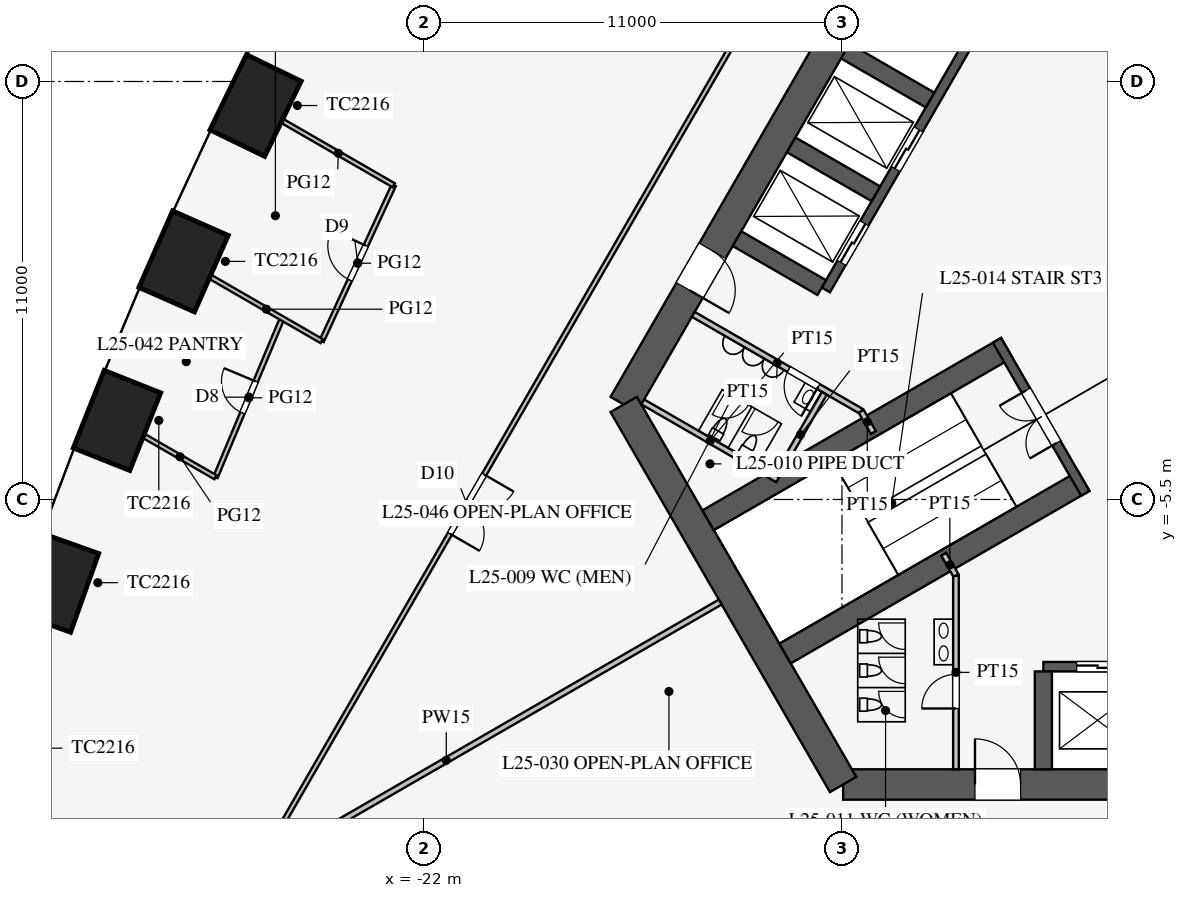
"""IFC4 building model, lengths in metres.
Left out: names, types, materials, properties, quantities, classifications, styles, units other than length and angle.
Written with IfcOpenShell. Run it as: python <this file> out.ifc"""

import sys

from ifc_helpers import new_model, si_unit, direction, frame, frame_2d, origin, origin_2d, place, context, subcontext, project, spatial, rectangle, extrude, element, fill, save


model = new_model("IFC4")
c1 = context("Model", 3, precision=1e-05, world=origin(), true_north=direction((0.0, 1.0)))
c2 = subcontext(c1, "Body", "Model", "MODEL_VIEW")
j1 = project(units=[si_unit("LENGTHUNIT", "METRE"), si_unit("PLANEANGLEUNIT", "RADIAN")], contexts=[c1])
p1 = place(None, origin())
s1 = spatial("IfcSite", under=j1, at=p1, CompositionType="ELEMENT")
p2 = place(p1, origin())
s2 = spatial("IfcBuilding", under=s1, at=p2, CompositionType="ELEMENT")
p3 = place(p2, frame((0.0, 0.0, 111.5)))
s3 = spatial("IfcBuildingStorey", under=s2, at=p3, CompositionType="ELEMENT", Elevation=111.5)
for number, where, z_axis, x_axis in (
    (1, (-26.43, 4.867, 0.0), (0.0, 0.0, 1.0), (-0.436, -0.9, 0.0)),
    (2, (-28.325, 0.765, 0.0), (0.0, 0.0, 1.0), (-0.403, -0.915, 0.0)),
    (3, (-30.077, -3.42, 0.0), (0.0, 0.0, 1.0), (-0.37, -0.929, 0.0)),
    (4, (-31.682, -7.689, 0.0), (0.0, 0.0, 1.0), (-0.336, -0.942, 0.0)),
):
    element("IfcColumn", number, at=place(p3, frame(where, z_axis=z_axis, x_axis=x_axis)), inside=s3, PredefinedType="COLUMN", context=c2, shape_type="SweptSolid", body=[
        extrude(rectangle(XDim=2.2, YDim=1.6, at=origin_2d()), origin(), (0.0, 0.0, 1.0), 4.2),
    ])
p4 = place(p3, frame((-10.97, -13.0, 0.0), z_axis=(0.0, 0.0, 1.0), x_axis=(1.0, 0.0, 0.0)))
e5 = element("IfcWall", 5, at=p4, inside=s3, PredefinedType="SHEAR", context=c2, shape_type="SweptSolid", body=[
    extrude(rectangle(XDim=21.939, YDim=0.8, at=frame_2d((10.97, 0.0))), origin(), (0.0, 0.0, 1.0), 4.2),
])
p5 = place(p4, frame((17.27, 0.0, 0.0)))
e6 = element("IfcOpeningElement", 6, at=p5, cuts=e5, PredefinedType="OPENING", context=c2, shape_type="SweptSolid", body=[
    extrude(rectangle(XDim=1.2, YDim=2.1, at=frame_2d((0.6, 1.05))), frame((0.0, 0.41, 0.0), z_axis=(0.0, -1.0, 0.0), x_axis=(1.0, 0.0, 0.0)), (0.0, 0.0, 1.0), 0.82),
])
p6 = place(p4, frame((3.47, 0.0, 0.0)))
e7 = element("IfcOpeningElement", 7, at=p6, cuts=e5, PredefinedType="OPENING", context=c2, shape_type="SweptSolid", body=[
    extrude(rectangle(XDim=1.2, YDim=2.1, at=frame_2d((0.6, 1.05))), frame((0.0, 0.41, 0.0), z_axis=(0.0, -1.0, 0.0), x_axis=(1.0, 0.0, 0.0)), (0.0, 0.0, 1.0), 0.82),
])
p7 = place(p3, frame((-5.773, 16.0, 0.0), z_axis=(0.0, 0.0, 1.0), x_axis=(-0.500002442456, -0.866023993627, 0.0)))
e8 = element("IfcWall", 8, at=p7, inside=s3, PredefinedType="SHEAR", context=c2, shape_type="SweptSolid", body=[
    extrude(rectangle(XDim=21.939, YDim=0.8, at=frame_2d((10.97, 0.0))), origin(), (0.0, 0.0, 1.0), 4.2),
])
p8 = place(p7, frame((17.27, 0.0, 0.0)))
e9 = element("IfcOpeningElement", 9, at=p8, cuts=e8, PredefinedType="OPENING", context=c2, shape_type="SweptSolid", body=[
    extrude(rectangle(XDim=1.2, YDim=2.1, at=frame_2d((0.6, 1.05))), frame((0.0, 0.41, 0.0), z_axis=(0.0, -1.0, 0.0), x_axis=(1.0, 0.0, 0.0)), (0.0, 0.0, 1.0), 0.82),
])
p9 = place(p7, frame((3.47, 0.0, 0.0)))
e10 = element("IfcOpeningElement", 10, at=p9, cuts=e8, PredefinedType="OPENING", context=c2, shape_type="SweptSolid", body=[
    extrude(rectangle(XDim=1.2, YDim=2.1, at=frame_2d((0.6, 1.05))), frame((0.0, 0.41, 0.0), z_axis=(0.0, -1.0, 0.0), x_axis=(1.0, 0.0, 0.0)), (0.0, 0.0, 1.0), 0.82),
])
p10 = place(p3, frame((-16.743, -3.0, 0.0), z_axis=(0.0, 0.0, 1.0), x_axis=(0.499995765644, -0.866027848477, 0.0)))
e11 = element("IfcWall", 11, at=p10, inside=s3, PredefinedType="SHEAR", context=c2, shape_type="SweptSolid", body=[
    extrude(rectangle(XDim=11.547, YDim=0.8, at=frame_2d((5.773, 0.0))), origin(), (0.0, 0.0, 1.0), 4.2),
])
p11 = place(p3, frame((-5.7, -9.9, 0.0), z_axis=(0.0, 0.0, 1.0), x_axis=(1.0, 0.0, 0.0)))
e12 = element("IfcWall", 12, at=p11, inside=s3, PredefinedType="SHEAR", context=c2, shape_type="SweptSolid", body=[
    extrude(rectangle(XDim=11.4, YDim=0.25, at=frame_2d((5.7, 0.0))), origin(), (0.0, 0.0, 1.0), 4.2),
])
p12 = place(p11, frame((0.875, 0.0, 0.0)))
e13 = element("IfcOpeningElement", 13, at=p12, cuts=e12, PredefinedType="OPENING", context=c2, shape_type="SweptSolid", body=[
    extrude(rectangle(XDim=1.1, YDim=2.2, at=frame_2d((0.55, 1.1))), frame((0.0, 0.135, 0.0), z_axis=(0.0, -1.0, 0.0), x_axis=(1.0, 0.0, 0.0)), (0.0, 0.0, 1.0), 0.27),
])
p13 = place(p11, frame((3.725, 0.0, 0.0)))
e14 = element("IfcOpeningElement", 14, at=p13, cuts=e12, PredefinedType="OPENING", context=c2, shape_type="SweptSolid", body=[
    extrude(rectangle(XDim=1.1, YDim=2.2, at=frame_2d((0.55, 1.1))), frame((0.0, 0.135, 0.0), z_axis=(0.0, -1.0, 0.0), x_axis=(1.0, 0.0, 0.0)), (0.0, 0.0, 1.0), 0.27),
])
p14 = place(p11, frame((6.575, 0.0, 0.0)))
e15 = element("IfcOpeningElement", 15, at=p14, cuts=e12, PredefinedType="OPENING", context=c2, shape_type="SweptSolid", body=[
    extrude(rectangle(XDim=1.1, YDim=2.2, at=frame_2d((0.55, 1.1))), frame((0.0, 0.135, 0.0), z_axis=(0.0, -1.0, 0.0), x_axis=(1.0, 0.0, 0.0)), (0.0, 0.0, 1.0), 0.27),
])
p15 = place(p11, frame((9.425, 0.0, 0.0)))
e16 = element("IfcOpeningElement", 16, at=p15, cuts=e12, PredefinedType="OPENING", context=c2, shape_type="SweptSolid", body=[
    extrude(rectangle(XDim=1.1, YDim=2.2, at=frame_2d((0.55, 1.1))), frame((0.0, 0.135, 0.0), z_axis=(0.0, -1.0, 0.0), x_axis=(1.0, 0.0, 0.0)), (0.0, 0.0, 1.0), 0.27),
])
p16 = place(p3, frame((-5.7, -10.025, 0.0), z_axis=(0.0, 0.0, 1.0), x_axis=(0.0, -1.0, 0.0)))
e17 = element("IfcWall", 17, at=p16, inside=s3, PredefinedType="SHEAR", context=c2, shape_type="SweptSolid", body=[
    extrude(rectangle(XDim=2.575, YDim=0.45, at=frame_2d((1.288, 0.0))), origin(), (0.0, 0.0, 1.0), 4.2),
])
p17 = place(p3, frame((-5.724, 9.886, 0.0), z_axis=(0.0, 0.0, 1.0), x_axis=(-0.500001763848, -0.866024385424, 0.0)))
e18 = element("IfcWall", 18, at=p17, inside=s3, PredefinedType="SHEAR", context=c2, shape_type="SweptSolid", body=[
    extrude(rectangle(XDim=11.4, YDim=0.25, at=frame_2d((5.7, 0.0))), origin(), (0.0, 0.0, 1.0), 4.2),
])
p18 = place(p17, frame((6.525, 0.0, 0.0)))
e19 = element("IfcOpeningElement", 19, at=p18, cuts=e18, PredefinedType="OPENING", context=c2, shape_type="SweptSolid", body=[
    extrude(rectangle(XDim=1.2, YDim=2.2, at=frame_2d((0.6, 1.1))), frame((0.0, 0.135, 0.0), z_axis=(0.0, -1.0, 0.0), x_axis=(1.0, 0.0, 0.0)), (0.0, 0.0, 1.0), 0.27),
])
p19 = place(p17, frame((9.375, 0.0, 0.0)))
e20 = element("IfcOpeningElement", 20, at=p19, cuts=e18, PredefinedType="OPENING", context=c2, shape_type="SweptSolid", body=[
    extrude(rectangle(XDim=1.2, YDim=2.2, at=frame_2d((0.6, 1.1))), frame((0.0, 0.135, 0.0), z_axis=(0.0, -1.0, 0.0), x_axis=(1.0, 0.0, 0.0)), (0.0, 0.0, 1.0), 0.27),
])
for number, where, z_axis, x_axis in (
    (21, (-8.682, 5.012, 0.0), (0.0, 0.0, 1.0), (-0.866, 0.5, 0.0)),
    (22, (-10.107, 2.544, 0.0), (0.0, 0.0, 1.0), (-0.866, 0.5, 0.0)),
    (23, (-11.532, 0.076, 0.0), (0.0, 0.0, 1.0), (-0.866, 0.5, 0.0)),
):
    element("IfcWall", number, at=place(p3, frame(where, z_axis=z_axis, x_axis=x_axis)), inside=s3, PredefinedType="SHEAR", context=c2, shape_type="SweptSolid", body=[
        extrude(rectangle(XDim=2.575, YDim=0.45, at=frame_2d((1.288, 0.0))), origin(), (0.0, 0.0, 1.0), 4.2),
    ])
for number, where, z_axis, x_axis in (
    (24, (-6.663, -1.509, 0.0), (0.0, 0.0, 1.0), (-0.866, -0.5, 0.0)),
    (25, (-4.638, -5.016, 0.0), (0.0, 0.0, 1.0), (-0.866, -0.5, 0.0)),
):
    element("IfcWall", number, at=place(p3, frame(where, z_axis=z_axis, x_axis=x_axis)), inside=s3, PredefinedType="SHEAR", context=c2, shape_type="SweptSolid", body=[
        extrude(rectangle(XDim=9.075, YDim=0.6, at=frame_2d((4.538, 0.0))), origin(), (0.0, 0.0, 1.0), 4.2),
    ])
p20 = place(p3, frame((-6.922, -1.312, 0.0), z_axis=(0.0, 0.0, 1.0), x_axis=(0.499984536904, -0.866034331223, 0.0)))
e26 = element("IfcWall", 26, at=p20, inside=s3, PredefinedType="SHEAR", context=c2, shape_type="SweptSolid", body=[
    extrude(rectangle(XDim=4.65, YDim=0.25, at=frame_2d((2.325, 0.0))), origin(), (0.0, 0.0, 1.0), 4.2),
])
p21 = place(p20, frame((1.525, 0.0, 0.0)))
e27 = element("IfcOpeningElement", 27, at=p21, cuts=e26, PredefinedType="OPENING", context=c2, shape_type="SweptSolid", body=[
    extrude(rectangle(XDim=1.6, YDim=2.1, at=frame_2d((0.8, 1.05))), frame((0.0, 0.135, 0.0), z_axis=(0.0, -1.0, 0.0), x_axis=(1.0, 0.0, 0.0)), (0.0, 0.0, 1.0), 0.27),
])
p22 = place(p3, frame((-8.0, -7.5, 0.0), z_axis=(0.0, 0.0, 1.0), x_axis=(0.0, -1.0, 0.0)))
e28 = element("IfcWall", 28, at=p22, inside=s3, PredefinedType="PARTITIONING", context=c2, shape_type="SweptSolid", body=[
    extrude(rectangle(XDim=5.1, YDim=0.15, at=frame_2d((2.55, 0.0))), origin(), (0.0, 0.0, 1.0), 4.0),
])
p23 = place(p22, frame((2.6, 0.0, 0.0)))
e29 = element("IfcOpeningElement", 29, at=p23, cuts=e28, PredefinedType="OPENING", context=c2, shape_type="SweptSolid", body=[
    extrude(rectangle(XDim=0.9, YDim=2.1, at=frame_2d((0.45, 1.05))), frame((0.0, 0.085, 0.0), z_axis=(0.0, -1.0, 0.0), x_axis=(1.0, 0.0, 0.0)), (0.0, 0.0, 1.0), 0.17),
])
p24 = place(p3, frame((-10.495, -3.178, 0.0), z_axis=(0.0, 0.0, 1.0), x_axis=(-0.86602216432, 0.500005610874, 0.0)))
e30 = element("IfcWall", 30, at=p24, inside=s3, PredefinedType="PARTITIONING", context=c2, shape_type="SweptSolid", body=[
    extrude(rectangle(XDim=5.1, YDim=0.15, at=frame_2d((2.55, 0.0))), origin(), (0.0, 0.0, 1.0), 4.0),
])
p25 = place(p24, frame((1.3, 0.0, 0.0)))
e31 = element("IfcOpeningElement", 31, at=p25, cuts=e30, PredefinedType="OPENING", context=c2, shape_type="SweptSolid", body=[
    extrude(rectangle(XDim=0.9, YDim=2.1, at=frame_2d((0.45, 1.05))), frame((0.0, 0.085, 0.0), z_axis=(0.0, -1.0, 0.0), x_axis=(1.0, 0.0, 0.0)), (0.0, 0.0, 1.0), 0.17),
])
for number, where, z_axis, x_axis in (
    (32, (-10.495, -3.178, 0.0), (0.0, 0.0, 1.0), (0.5, -0.866, 0.0)),
    (33, (-8.0, -7.5, 0.0), (0.0, 0.0, 1.0), (-0.5, 0.866, 0.0)),
):
    element("IfcWall", number, at=place(p3, frame(where, z_axis=z_axis, x_axis=x_axis)), inside=s3, PredefinedType="PARTITIONING", context=c2, shape_type="SweptSolid", body=[
        extrude(rectangle(XDim=0.645, YDim=0.15, at=frame_2d((0.323, 0.0))), origin(), (0.0, 0.0, 1.0), 4.0),
    ])
p26 = place(p3, frame((-12.691, -4.982, 0.0), z_axis=(0.0, 0.0, 1.0), x_axis=(-0.8660249478, 0.500000789788, 0.0)))
e34 = element("IfcWall", 34, at=p26, inside=s3, PredefinedType="PARTITIONING", context=c2, shape_type="SweptSolid", body=[
    extrude(rectangle(XDim=4.1, YDim=0.15, at=frame_2d((2.05, 0.0))), origin(), (0.0, 0.0, 1.0), 4.0),
])
p27 = place(p3, frame((-11.464, -2.706, 0.0), z_axis=(0.0, 0.0, 1.0), x_axis=(-0.50001992892, -0.866013897511, 0.0)))
e35 = element("IfcWall", 35, at=p27, inside=s3, PredefinedType="PARTITIONING", context=c2, shape_type="SweptSolid", body=[
    extrude(rectangle(XDim=2.51, YDim=0.15, at=frame_2d((1.255, 0.0))), origin(), (0.0, 0.0, 1.0), 4.0),
])
p28 = place(p3, frame((-14.203, -8.2, 0.0), z_axis=(0.0, 0.0, 1.0), x_axis=(-0.866024668836, -0.500001272966, 0.0)))
e36 = element("IfcWall", 36, at=p28, inside=s3, PredefinedType="PARTITIONING", context=c2, shape_type="SweptSolid", body=[
    extrude(rectangle(XDim=16.65, YDim=0.15, at=frame_2d((8.325, 0.0))), origin(), (0.0, 0.0, 1.0), 2.3),
])
p29 = place(p3, frame((-0.016, 30.491, 0.0), z_axis=(0.0, 0.0, 1.0), x_axis=(-0.50000091641, -0.866024874695, 0.0)))
e37 = element("IfcWall", 37, at=p29, inside=s3, PredefinedType="PARTITIONING", context=c2, shape_type="SweptSolid", body=[
    extrude(rectangle(XDim=52.796, YDim=0.12, at=frame_2d((26.398, 0.0))), origin(), (0.0, 0.0, 1.0), 2.9),
])
p30 = place(p29, frame((10.2, 0.0, 0.15)))
e38 = element("IfcOpeningElement", 38, at=p30, cuts=e37, PredefinedType="OPENING", context=c2, shape_type="SweptSolid", body=[
    extrude(rectangle(XDim=1.8, YDim=2.1, at=frame_2d((0.9, 1.05))), frame((0.0, 0.07, 0.0), z_axis=(0.0, -1.0, 0.0), x_axis=(1.0, 0.0, 0.0)), (0.0, 0.0, 1.0), 0.14),
])
p31 = place(p29, frame((40.8, 0.0, 0.15)))
e39 = element("IfcOpeningElement", 39, at=p31, cuts=e37, PredefinedType="OPENING", context=c2, shape_type="SweptSolid", body=[
    extrude(rectangle(XDim=1.8, YDim=2.1, at=frame_2d((0.9, 1.05))), frame((0.0, 0.07, 0.0), z_axis=(0.0, -1.0, 0.0), x_axis=(1.0, 0.0, 0.0)), (0.0, 0.0, 1.0), 0.14),
])
p32 = place(p3, frame((-25.731, -0.732, 0.0), z_axis=(0.0, 0.0, 1.0), x_axis=(-0.386742917128, -0.92218757097, 0.0)))
e40 = element("IfcWall", 40, at=p32, inside=s3, PredefinedType="PARTITIONING", context=c2, shape_type="SweptSolid", body=[
    extrude(rectangle(XDim=4.536, YDim=0.12, at=frame_2d((2.268, 0.0))), origin(), (0.0, 0.0, 1.0), 2.9),
])
p33 = place(p32, frame((1.8, 0.0, 0.15)))
e41 = element("IfcOpeningElement", 41, at=p33, cuts=e40, PredefinedType="OPENING", context=c2, shape_type="SweptSolid", body=[
    extrude(rectangle(XDim=0.9, YDim=2.1, at=frame_2d((0.45, 1.05))), frame((0.0, 0.07, 0.0), z_axis=(0.0, -1.0, 0.0), x_axis=(1.0, 0.0, 0.0)), (0.0, 0.0, 1.0), 0.14),
])
p34 = place(p3, frame((-22.795, 2.768, 0.0), z_axis=(0.0, 0.0, 1.0), x_axis=(-0.41992827805, -0.90755729367, 0.0)))
e42 = element("IfcWall", 42, at=p34, inside=s3, PredefinedType="PARTITIONING", context=c2, shape_type="SweptSolid", body=[
    extrude(rectangle(XDim=4.519, YDim=0.12, at=frame_2d((2.259, 0.0))), origin(), (0.0, 0.0, 1.0), 2.9),
])
p35 = place(p34, frame((1.75, 0.0, 0.15)))
e43 = element("IfcOpeningElement", 43, at=p35, cuts=e42, PredefinedType="OPENING", context=c2, shape_type="SweptSolid", body=[
    extrude(rectangle(XDim=1.0, YDim=2.1, at=frame_2d((0.5, 1.05))), frame((0.0, 0.07, 0.0), z_axis=(0.0, -1.0, 0.0), x_axis=(1.0, 0.0, 0.0)), (0.0, 0.0, 1.0), 0.14),
])
p36 = place(p3, frame((-24.692, -1.333, 0.0), z_axis=(0.0, 0.0, 1.0), x_axis=(-0.866025882247, 0.499999171277, 0.0)))
e44 = element("IfcWall", 44, at=p36, inside=s3, PredefinedType="PARTITIONING", context=c2, shape_type="SweptSolid", body=[
    extrude(rectangle(XDim=3.36, YDim=0.12, at=frame_2d((1.68, 0.0))), origin(), (0.0, 0.0, 1.0), 2.6),
])
p37 = place(p3, frame((-27.486, -4.916, 0.0), z_axis=(0.0, 0.0, 1.0), x_axis=(-0.865987299264, 0.500065993159, 0.0)))
e45 = element("IfcWall", 45, at=p37, inside=s3, PredefinedType="PARTITIONING", context=c2, shape_type="SweptSolid", body=[
    extrude(rectangle(XDim=2.153, YDim=0.12, at=frame_2d((1.077, 0.0))), origin(), (0.0, 0.0, 1.0), 2.8),
])
p38 = place(p3, frame((-22.795, 2.768, 0.0), z_axis=(0.0, 0.0, 1.0), x_axis=(-0.866024928363, 0.500000823453, 0.0)))
e46 = element("IfcWall", 46, at=p38, inside=s3, PredefinedType="PARTITIONING", context=c2, shape_type="SweptSolid", body=[
    extrude(rectangle(XDim=3.366, YDim=0.12, at=frame_2d((1.683, 0.0))), origin(), (0.0, 0.0, 1.0), 2.9),
])
p39 = place(p23, frame((0.9, 0.0, 0.0), z_axis=(0.0, 0.0, 1.0), x_axis=(-1.0, 0.0, 0.0)))
e47 = element("IfcDoor", 47, at=p39, inside=s3, OperationType="SINGLE_SWING_LEFT", PredefinedType="DOOR", context=c2, shape_type="SweptSolid", body=[
    extrude(rectangle(XDim=0.9, YDim=2.1, at=frame_2d((0.45, 1.05))), frame((0.0, 0.025, 0.0), z_axis=(0.0, -1.0, 0.0), x_axis=(1.0, 0.0, 0.0)), (0.0, 0.0, 1.0), 0.05),
])
fill(e29, e47)
p40 = place(p25, origin())
e48 = element("IfcDoor", 48, at=p40, inside=s3, OperationType="SINGLE_SWING_LEFT", PredefinedType="DOOR", context=c2, shape_type="SweptSolid", body=[
    extrude(rectangle(XDim=0.9, YDim=2.1, at=frame_2d((0.45, 1.05))), frame((0.0, 0.025, 0.0), z_axis=(0.0, -1.0, 0.0), x_axis=(1.0, 0.0, 0.0)), (0.0, 0.0, 1.0), 0.05),
])
fill(e31, e48)
p41 = place(p21, frame((1.6, 0.0, 0.0), z_axis=(0.0, 0.0, 1.0), x_axis=(-1.0, 0.0, 0.0)))
e49 = element("IfcDoor", 49, at=p41, inside=s3, OperationType="DOUBLE_DOOR_SINGLE_SWING", PredefinedType="DOOR", context=c2, shape_type="SweptSolid", body=[
    extrude(rectangle(XDim=1.6, YDim=2.1, at=frame_2d((0.8, 1.05))), frame((0.0, 0.025, 0.0), z_axis=(0.0, -1.0, 0.0), x_axis=(1.0, 0.0, 0.0)), (0.0, 0.0, 1.0), 0.05),
])
fill(e27, e49)
p42 = place(p6, origin())
e50 = element("IfcDoor", 50, at=p42, inside=s3, OperationType="SINGLE_SWING_LEFT", PredefinedType="DOOR", context=c2, shape_type="SweptSolid", body=[
    extrude(rectangle(XDim=1.2, YDim=2.1, at=frame_2d((0.6, 1.05))), frame((0.0, 0.025, 0.0), z_axis=(0.0, -1.0, 0.0), x_axis=(1.0, 0.0, 0.0)), (0.0, 0.0, 1.0), 0.05),
])
fill(e7, e50)
p43 = place(p8, origin())
e51 = element("IfcDoor", 51, at=p43, inside=s3, OperationType="SINGLE_SWING_RIGHT", PredefinedType="DOOR", context=c2, shape_type="SweptSolid", body=[
    extrude(rectangle(XDim=1.2, YDim=2.1, at=frame_2d((0.6, 1.05))), frame((0.0, 0.025, 0.0), z_axis=(0.0, -1.0, 0.0), x_axis=(1.0, 0.0, 0.0)), (0.0, 0.0, 1.0), 0.05),
])
fill(e9, e51)
p44 = place(p35, frame((1.0, 0.0, 0.0), z_axis=(0.0, 0.0, 1.0), x_axis=(-1.0, 0.0, 0.0)))
e52 = element("IfcDoor", 52, at=p44, inside=s3, OperationType="SINGLE_SWING_RIGHT", PredefinedType="DOOR", context=c2, shape_type="SweptSolid", body=[
    extrude(rectangle(XDim=1.0, YDim=2.1, at=frame_2d((0.5, 1.05))), frame((0.0, 0.025, 0.0), z_axis=(0.0, -1.0, 0.0), x_axis=(1.0, 0.0, 0.0)), (0.0, 0.0, 1.0), 0.05),
])
fill(e43, e52)
p45 = place(p33, frame((0.9, 0.0, 0.0), z_axis=(0.0, 0.0, 1.0), x_axis=(-1.0, 0.0, 0.0)))
e53 = element("IfcDoor", 53, at=p45, inside=s3, OperationType="SINGLE_SWING_RIGHT", PredefinedType="DOOR", context=c2, shape_type="SweptSolid", body=[
    extrude(rectangle(XDim=0.9, YDim=2.1, at=frame_2d((0.45, 1.05))), frame((0.0, 0.025, 0.0), z_axis=(0.0, -1.0, 0.0), x_axis=(1.0, 0.0, 0.0)), (0.0, 0.0, 1.0), 0.05),
])
fill(e41, e53)
p46 = place(p31, origin())
e54 = element("IfcDoor", 54, at=p46, inside=s3, OperationType="DOUBLE_DOOR_SINGLE_SWING", PredefinedType="DOOR", context=c2, shape_type="SweptSolid", body=[
    extrude(rectangle(XDim=1.8, YDim=2.1, at=frame_2d((0.9, 1.05))), frame((0.0, 0.025, 0.0), z_axis=(0.0, -1.0, 0.0), x_axis=(1.0, 0.0, 0.0)), (0.0, 0.0, 1.0), 0.05),
])
fill(e39, e54)
p47 = place(p12, origin())
e55 = element("IfcDoor", 55, at=p47, inside=s3, OperationType="DOUBLE_DOOR_SLIDING", PredefinedType="DOOR", context=c2, shape_type="SweptSolid", body=[
    extrude(rectangle(XDim=1.1, YDim=2.2, at=frame_2d((0.55, 1.1))), frame((0.0, 0.025, 0.0), z_axis=(0.0, -1.0, 0.0), x_axis=(1.0, 0.0, 0.0)), (0.0, 0.0, 1.0), 0.05),
])
fill(e13, e55)
p48 = place(p18, origin())
e56 = element("IfcDoor", 56, at=p48, inside=s3, OperationType="DOUBLE_DOOR_SLIDING", PredefinedType="DOOR", context=c2, shape_type="SweptSolid", body=[
    extrude(rectangle(XDim=1.2, YDim=2.2, at=frame_2d((0.6, 1.1))), frame((0.0, 0.025, 0.0), z_axis=(0.0, -1.0, 0.0), x_axis=(1.0, 0.0, 0.0)), (0.0, 0.0, 1.0), 0.05),
])
fill(e19, e56)
p49 = place(p19, origin())
e57 = element("IfcDoor", 57, at=p49, inside=s3, OperationType="DOUBLE_DOOR_SLIDING", PredefinedType="DOOR", context=c2, shape_type="SweptSolid", body=[
    extrude(rectangle(XDim=1.2, YDim=2.2, at=frame_2d((0.6, 1.1))), frame((0.0, 0.025, 0.0), z_axis=(0.0, -1.0, 0.0), x_axis=(1.0, 0.0, 0.0)), (0.0, 0.0, 1.0), 0.05),
])
fill(e20, e57)
save(model, sys.argv[1])
